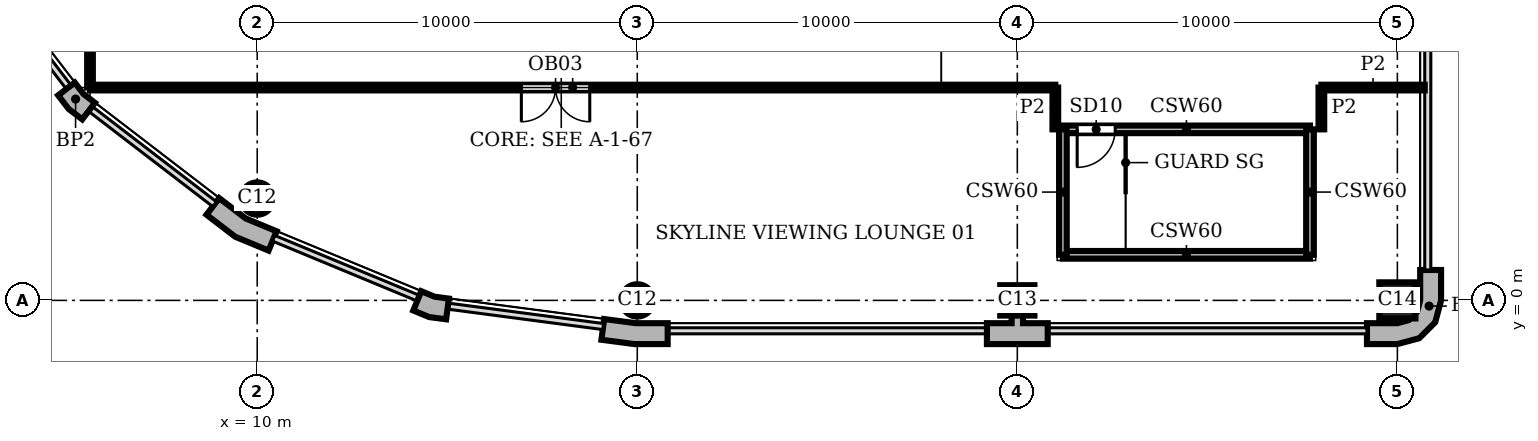
"""IFC4 building model, lengths in metres.
Left out: names, types, materials, properties, quantities, classifications, styles, units other than length and angle.
Written with IfcOpenShell. Run it as: python <this file> out.ifc"""

import sys

from ifc_helpers import new_model, si_unit, direction, frame, frame_2d, origin, origin_2d, place, context, subcontext, project, spatial, polyline, rectangle, circle, outline, extrude, element, fill, save


model = new_model("IFC4")
c1 = context("Model", 3, precision=1e-05, world=origin(), true_north=direction((0.0, 1.0)))
c2 = subcontext(c1, "Body", "Model", "MODEL_VIEW")
j1 = project(units=[si_unit("LENGTHUNIT", "METRE"), si_unit("PLANEANGLEUNIT", "RADIAN")], contexts=[c1])
p1 = place(None, origin())
s1 = spatial("IfcSite", under=j1, at=p1, CompositionType="ELEMENT")
p2 = place(p1, origin())
s2 = spatial("IfcBuilding", under=s1, at=p2, CompositionType="ELEMENT")
p3 = place(p2, frame((0.0, 0.0, 358.2)))
s3 = spatial("IfcBuildingStorey", under=s2, at=p3, CompositionType="ELEMENT", Elevation=358.2)
p4 = place(p3, frame((20.0, 0.0, 0.0), z_axis=(0.0, 0.0, 1.0), x_axis=(1.0, 0.0, 0.0)))
e1 = element("IfcColumn", 1, at=p4, inside=s3, PredefinedType="COLUMN", context=c2, shape_type="SweptSolid", body=[
    extrude(circle(Radius=0.425, at=origin_2d()), origin(), (0.0, 0.0, 1.0), 7.2),
])
p5 = place(p3, frame((30.0, 0.0, 0.0), z_axis=(0.0, 0.0, 1.0), x_axis=(1.0, 0.0, 0.0)))
e2 = element("IfcColumn", 2, at=p5, inside=s3, PredefinedType="COLUMN", context=c2, shape_type="SweptSolid", body=[
    extrude(rectangle(XDim=0.9, YDim=0.8, at=origin_2d()), origin(), (0.0, 0.0, 1.0), 7.2),
])
p6 = place(p3, frame((40.0, 0.0, 0.0), z_axis=(0.0, 0.0, 1.0), x_axis=(1.0, 0.0, 0.0)))
e3 = element("IfcColumn", 3, at=p6, inside=s3, PredefinedType="COLUMN", context=c2, shape_type="SweptSolid", body=[
    extrude(rectangle(XDim=0.95, YDim=0.95, at=origin_2d()), origin(), (0.0, 0.0, 1.0), 7.2),
])
p7 = place(p3, frame((10.0, 2.679, 0.0), z_axis=(0.0, 0.0, 1.0), x_axis=(1.0, 0.0, 0.0)))
e4 = element("IfcColumn", 4, at=p7, inside=s3, PredefinedType="COLUMN", context=c2, shape_type="SweptSolid", body=[
    extrude(circle(Radius=0.425, at=origin_2d()), origin(), (0.0, 0.0, 1.0), 7.2),
])
p8 = place(p3, origin())
e5 = element("IfcWall", 5, at=p8, inside=s3, PredefinedType="SOLIDWALL", context=c2, shape_type="SweptSolid", body=[
    extrude(outline(polyline([(19.076, -0.887), (19.057, -1.036), (19.925, -1.15), (20.8, -1.15), (20.8, -1.0), (20.8, -0.6), (19.961, -0.6), (19.128, -0.49), (19.076, -0.887)])), origin(), (0.0, 0.0, 1.0), 7.2),
])
e6 = element("IfcWall", 6, at=p8, inside=s3, PredefinedType="SOLIDWALL", context=c2, shape_type="SweptSolid", body=[
    extrude(outline(polyline([(30.8, -0.6), (30.15, -0.6), (30.15, 0.0), (29.85, 0.0), (29.85, -0.6), (29.2, -0.6), (29.2, -1.0), (29.2, -1.15), (30.0, -1.15), (30.8, -1.15), (30.8, -1.0), (30.8, -0.6)])), origin(), (0.0, 0.0, 1.0), 7.2),
])
e7 = element("IfcWall", 7, at=p8, inside=s3, PredefinedType="SOLIDWALL", context=c2, shape_type="SweptSolid", body=[
    extrude(outline(polyline([(39.2, -1.0), (39.2, -1.15), (40.0, -1.15), (40.575, -0.996), (40.996, -0.575), (41.15, 0.0), (41.15, 0.8), (41.0, 0.8), (40.6, 0.8), (40.6, 0.0), (40.52, -0.3), (40.3, -0.52), (40.0, -0.6), (39.2, -0.6), (39.2, -1.0)])), origin(), (0.0, 0.0, 1.0), 7.2),
])
e8 = element("IfcWall", 8, at=p8, inside=s3, PredefinedType="SOLIDWALL", context=c2, shape_type="SweptSolid", body=[
    extrude(outline(polyline([(4.882, 5.487), (4.763, 5.396), (5.038, 5.038), (5.396, 4.763), (5.487, 4.882), (5.731, 5.199), (5.43, 5.43), (5.199, 5.731), (4.882, 5.487)])), origin(), (0.0, 0.0, 1.0), 7.2),
])
e9 = element("IfcWall", 9, at=p8, inside=s3, PredefinedType="SOLIDWALL", context=c2, shape_type="SweptSolid", body=[
    extrude(outline(polyline([(8.757, 2.373), (8.665, 2.254), (9.42, 1.675), (10.299, 1.311), (10.356, 1.449), (10.51, 1.819), (9.698, 2.155), (9.0, 2.69), (8.757, 2.373)])), origin(), (0.0, 0.0, 1.0), 7.2),
])
e10 = element("IfcWall", 10, at=p8, inside=s3, PredefinedType="SOLIDWALL", context=c2, shape_type="SweptSolid", body=[
    extrude(outline(polyline([(14.164, -0.128), (14.106, -0.266), (14.523, -0.439), (14.971, -0.498), (14.99, -0.349), (15.043, 0.047), (14.667, 0.097), (14.317, 0.242), (14.164, -0.128)])), origin(), (0.0, 0.0, 1.0), 7.2),
])
p9 = place(p3, frame((31.2, 1.2, 0.0), z_axis=(0.0, 0.0, 1.0), x_axis=(1.0, 0.0, 0.0)))
e11 = element("IfcWall", 11, at=p9, inside=s3, PredefinedType="SHEAR", context=c2, shape_type="SweptSolid", body=[
    extrude(rectangle(XDim=6.5, YDim=0.2, at=frame_2d((3.25, 0.0))), origin(), (0.0, 0.0, 1.0), 6.75),
])
p10 = place(p3, frame((31.2, 4.5, 0.0), z_axis=(0.0, 0.0, 1.0), x_axis=(1.0, 0.0, 0.0)))
e12 = element("IfcWall", 12, at=p10, inside=s3, PredefinedType="SHEAR", context=c2, shape_type="SweptSolid", body=[
    extrude(rectangle(XDim=6.5, YDim=0.2, at=frame_2d((3.25, 0.0))), origin(), (0.0, 0.0, 1.0), 6.75),
])
p11 = place(p10, frame((0.375, 0.0, 0.0)))
e13 = element("IfcOpeningElement", 13, at=p11, cuts=e12, PredefinedType="OPENING", context=c2, shape_type="SweptSolid", body=[
    extrude(rectangle(XDim=1.0, YDim=2.1, at=frame_2d((0.5, 1.05))), frame((0.0, 0.11, 0.0), z_axis=(0.0, -1.0, 0.0), x_axis=(1.0, 0.0, 0.0)), (0.0, 0.0, 1.0), 0.22),
])
for number, where, z_axis, x_axis in (
    (14, (31.2, 1.2, 0.0), (0.0, 0.0, 1.0), (0.0, 1.0, 0.0)),
    (15, (37.7, 1.2, 0.0), (0.0, 0.0, 1.0), (0.0, 1.0, 0.0)),
):
    element("IfcWall", number, at=place(p3, frame(where, z_axis=z_axis, x_axis=x_axis)), inside=s3, PredefinedType="SHEAR", context=c2, shape_type="SweptSolid", body=[
        extrude(rectangle(XDim=3.3, YDim=0.2, at=frame_2d((1.65, 0.0))), origin(), (0.0, 0.0, 1.0), 6.75),
    ])
p12 = place(p3, frame((5.6, 5.6, 0.0), z_axis=(0.0, 0.0, 1.0), x_axis=(0.0, 1.0, 0.0)))
e16 = element("IfcWall", 16, at=p12, inside=s3, PredefinedType="PARTITIONING", context=c2, shape_type="SweptSolid", body=[
    extrude(rectangle(XDim=22.4, YDim=0.15, at=frame_2d((11.2, 0.0))), origin(), (0.0, 0.0, 1.0), 6.75),
])
p13 = place(p12, frame((4.1, 0.0, 0.0)))
e17 = element("IfcOpeningElement", 17, at=p13, cuts=e16, PredefinedType="OPENING", context=c2, shape_type="SweptSolid", body=[
    extrude(rectangle(XDim=1.0, YDim=2.1, at=frame_2d((0.5, 1.05))), frame((0.0, 0.085, 0.0), z_axis=(0.0, -1.0, 0.0), x_axis=(1.0, 0.0, 0.0)), (0.0, 0.0, 1.0), 0.17),
])
p14 = place(p12, frame((11.5, 0.0, 0.0)))
e18 = element("IfcOpeningElement", 18, at=p14, cuts=e16, PredefinedType="OPENING", context=c2, shape_type="SweptSolid", body=[
    extrude(rectangle(XDim=0.8, YDim=2.1, at=frame_2d((0.4, 1.05))), frame((0.0, 0.085, 0.0), z_axis=(0.0, -1.0, 0.0), x_axis=(1.0, 0.0, 0.0)), (0.0, 0.0, 1.0), 0.17),
])
for number, where, z_axis, x_axis in (
    (19, (31.0, 4.5, 0.0), (0.0, 0.0, 1.0), (0.0, 1.0, 0.0)),
    (20, (38.0, 4.5, 0.0), (0.0, 0.0, 1.0), (0.0, 1.0, 0.0)),
):
    element("IfcWall", number, at=place(p3, frame(where, z_axis=z_axis, x_axis=x_axis)), inside=s3, PredefinedType="PARTITIONING", context=c2, shape_type="SweptSolid", body=[
        extrude(rectangle(XDim=1.1, YDim=0.15, at=frame_2d((0.55, 0.0))), origin(), (0.0, 0.0, 1.0), 6.75),
    ])
p15 = place(p3, frame((5.6, 5.6, 0.0), z_axis=(0.0, 0.0, 1.0), x_axis=(1.0, 0.0, 0.0)))
e21 = element("IfcWall", 21, at=p15, inside=s3, PredefinedType="PARTITIONING", context=c2, shape_type="SweptSolid", body=[
    extrude(rectangle(XDim=25.4, YDim=0.15, at=frame_2d((12.7, 0.0))), origin(), (0.0, 0.0, 1.0), 6.75),
])
p16 = place(p15, frame((11.35, 0.0, 0.0)))
e22 = element("IfcOpeningElement", 22, at=p16, cuts=e21, PredefinedType="OPENING", context=c2, shape_type="SweptSolid", body=[
    extrude(rectangle(XDim=1.8, YDim=2.1, at=frame_2d((0.9, 1.05))), frame((0.0, 0.085, 0.0), z_axis=(0.0, -1.0, 0.0), x_axis=(1.0, 0.0, 0.0)), (0.0, 0.0, 1.0), 0.17),
])
p17 = place(p3, frame((38.0, 5.6, 0.0), z_axis=(0.0, 0.0, 1.0), x_axis=(1.0, 0.0, 0.0)))
e23 = element("IfcWall", 23, at=p17, inside=s3, PredefinedType="PARTITIONING", context=c2, shape_type="SweptSolid", body=[
    extrude(rectangle(XDim=2.72, YDim=0.15, at=frame_2d((1.36, 0.0))), origin(), (0.0, 0.0, 1.0), 6.75),
])
p18 = place(p11, frame((1.0, 0.0, 0.0), z_axis=(0.0, 0.0, 1.0), x_axis=(-1.0, 0.0, 0.0)))
e24 = element("IfcDoor", 24, at=p18, inside=s3, OperationType="SINGLE_SWING_RIGHT", PredefinedType="DOOR", context=c2, shape_type="SweptSolid", body=[
    extrude(rectangle(XDim=1.0, YDim=2.1, at=frame_2d((0.5, 1.05))), frame((0.0, 0.025, 0.0), z_axis=(0.0, -1.0, 0.0), x_axis=(1.0, 0.0, 0.0)), (0.0, 0.0, 1.0), 0.05),
])
fill(e13, e24)
p19 = place(p16, frame((1.8, 0.0, 0.0), z_axis=(0.0, 0.0, 1.0), x_axis=(-1.0, 0.0, 0.0)))
e25 = element("IfcDoor", 25, at=p19, inside=s3, OperationType="DOUBLE_DOOR_SINGLE_SWING", PredefinedType="DOOR", context=c2, shape_type="SweptSolid", body=[
    extrude(rectangle(XDim=1.8, YDim=2.1, at=frame_2d((0.9, 1.05))), frame((0.0, 0.025, 0.0), z_axis=(0.0, -1.0, 0.0), x_axis=(1.0, 0.0, 0.0)), (0.0, 0.0, 1.0), 0.05),
])
fill(e22, e25)
save(model, sys.argv[1])
